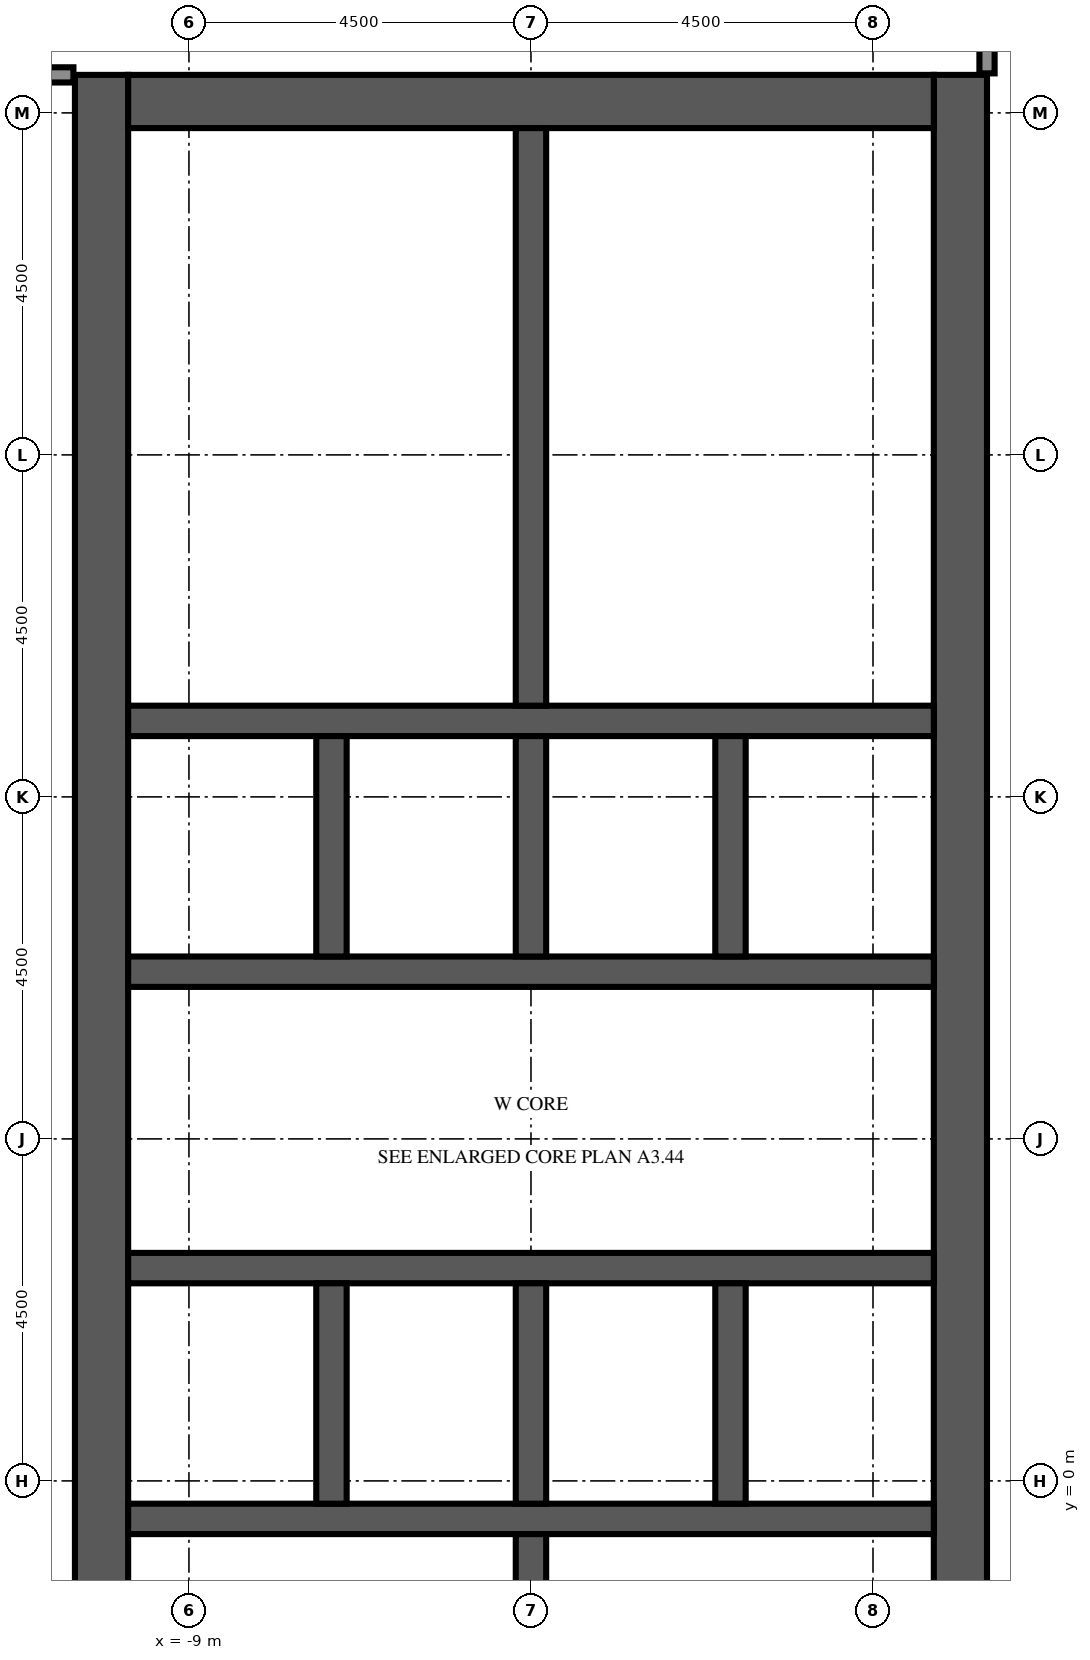
"""IFC4 building model, lengths in metres.
Left out: names, types, materials, properties, quantities, classifications, styles, units other than length and angle.
Written with IfcOpenShell. Run it as: python <this file> out.ifc"""

import sys

from ifc_helpers import new_model, si_unit, direction, frame, frame_2d, origin, place, context, subcontext, project, spatial, rectangle, extrude, element, fill, save


model = new_model("IFC4")
c1 = context("Model", 3, precision=1e-05, world=origin(), true_north=direction((0.0, 1.0)))
c2 = subcontext(c1, "Body", "Model", "MODEL_VIEW")
j1 = project(units=[si_unit("LENGTHUNIT", "METRE"), si_unit("PLANEANGLEUNIT", "RADIAN")], contexts=[c1])
p1 = place(None, origin())
s1 = spatial("IfcSite", under=j1, at=p1, CompositionType="ELEMENT")
p2 = place(p1, origin())
s2 = spatial("IfcBuilding", under=s1, at=p2, CompositionType="ELEMENT")
p3 = place(p2, frame((0.0, 0.0, 301.0)))
s3 = spatial("IfcBuildingStorey", under=s2, at=p3, CompositionType="ELEMENT", Elevation=301.0)
p4 = place(p3, frame((-10.15, -9.0, 0.0), z_axis=(0.0, 0.0, 1.0), x_axis=(0.0, 1.0, 0.0)))
e1 = element("IfcWall", 1, at=p4, inside=s3, PredefinedType="SHEAR", context=c2, shape_type="SweptSolid", body=[
    extrude(rectangle(XDim=27.5, YDim=0.7, at=frame_2d((13.75, 0.0))), origin(), (0.0, 0.0, 1.0), 5.4),
])
p5 = place(p4, frame((12.55, 0.0, 0.0)))
e2 = element("IfcOpeningElement", 2, at=p5, cuts=e1, PredefinedType="OPENING", context=c2, shape_type="SweptSolid", body=[
    extrude(rectangle(XDim=2.4, YDim=2.4, at=frame_2d((1.2, 1.2))), frame((0.0, 0.36, 0.0), z_axis=(0.0, -1.0, 0.0), x_axis=(1.0, 0.0, 0.0)), (0.0, 0.0, 1.0), 0.72),
])
p6 = place(p4, frame((6.825, 0.0, 0.0)))
e3 = element("IfcOpeningElement", 3, at=p6, cuts=e1, PredefinedType="OPENING", context=c2, shape_type="SweptSolid", body=[
    extrude(rectangle(XDim=1.2, YDim=2.1, at=frame_2d((0.6, 1.05))), frame((0.0, 0.36, 0.0), z_axis=(0.0, -1.0, 0.0), x_axis=(1.0, 0.0, 0.0)), (0.0, 0.0, 1.0), 0.72),
])
p7 = place(p4, frame((19.475, 0.0, 0.0)))
e4 = element("IfcOpeningElement", 4, at=p7, cuts=e1, PredefinedType="OPENING", context=c2, shape_type="SweptSolid", body=[
    extrude(rectangle(XDim=1.2, YDim=2.1, at=frame_2d((0.6, 1.05))), frame((0.0, 0.36, 0.0), z_axis=(0.0, -1.0, 0.0), x_axis=(1.0, 0.0, 0.0)), (0.0, 0.0, 1.0), 0.72),
])
p8 = place(p3, frame((1.15, -9.0, 0.0), z_axis=(0.0, 0.0, 1.0), x_axis=(0.0, 1.0, 0.0)))
e5 = element("IfcWall", 5, at=p8, inside=s3, PredefinedType="SHEAR", context=c2, shape_type="SweptSolid", body=[
    extrude(rectangle(XDim=27.5, YDim=0.7, at=frame_2d((13.75, 0.0))), origin(), (0.0, 0.0, 1.0), 5.4),
])
p9 = place(p8, frame((12.55, 0.0, 0.0)))
e6 = element("IfcOpeningElement", 6, at=p9, cuts=e5, PredefinedType="OPENING", context=c2, shape_type="SweptSolid", body=[
    extrude(rectangle(XDim=2.4, YDim=2.4, at=frame_2d((1.2, 1.2))), frame((0.0, 0.36, 0.0), z_axis=(0.0, -1.0, 0.0), x_axis=(1.0, 0.0, 0.0)), (0.0, 0.0, 1.0), 0.72),
])
p10 = place(p8, frame((5.46, 0.0, 0.0)))
e7 = element("IfcOpeningElement", 7, at=p10, cuts=e5, PredefinedType="OPENING", context=c2, shape_type="SweptSolid", body=[
    extrude(rectangle(XDim=0.968, YDim=2.1, at=frame_2d((0.484, 1.05))), frame((0.0, 0.36, 0.0), z_axis=(0.0, -1.0, 0.0), x_axis=(1.0, 0.0, 0.0)), (0.0, 0.0, 1.0), 0.72),
])
p11 = place(p8, frame((23.54, 0.0, 0.0)))
e8 = element("IfcOpeningElement", 8, at=p11, cuts=e5, PredefinedType="OPENING", context=c2, shape_type="SweptSolid", body=[
    extrude(rectangle(XDim=1.2, YDim=2.1, at=frame_2d((0.6, 1.05))), frame((0.0, 0.36, 0.0), z_axis=(0.0, -1.0, 0.0), x_axis=(1.0, 0.0, 0.0)), (0.0, 0.0, 1.0), 0.72),
])
p12 = place(p3, frame((-9.8, 18.15, 0.0), z_axis=(0.0, 0.0, 1.0), x_axis=(1.0, 0.0, 0.0)))
e9 = element("IfcWall", 9, at=p12, inside=s3, PredefinedType="SHEAR", context=c2, shape_type="SweptSolid", body=[
    extrude(rectangle(XDim=10.6, YDim=0.7, at=frame_2d((5.3, 0.0))), origin(), (0.0, 0.0, 1.0), 5.4),
])
p13 = place(p3, frame((-9.8, -0.5, 0.0), z_axis=(0.0, 0.0, 1.0), x_axis=(1.0, 0.0, 0.0)))
e10 = element("IfcWall", 10, at=p13, inside=s3, PredefinedType="SHEAR", context=c2, shape_type="SweptSolid", body=[
    extrude(rectangle(XDim=10.6, YDim=0.4, at=frame_2d((5.3, 0.0))), origin(), (0.0, 0.0, 1.0), 5.4),
])
p14 = place(p3, frame((-9.8, 2.8, 0.0), z_axis=(0.0, 0.0, 1.0), x_axis=(1.0, 0.0, 0.0)))
e11 = element("IfcWall", 11, at=p14, inside=s3, PredefinedType="SHEAR", context=c2, shape_type="SweptSolid", body=[
    extrude(rectangle(XDim=10.6, YDim=0.4, at=frame_2d((5.3, 0.0))), origin(), (0.0, 0.0, 1.0), 5.4),
])
p15 = place(p14, frame((0.688, 0.0, 0.0)))
e12 = element("IfcOpeningElement", 12, at=p15, cuts=e11, PredefinedType="OPENING", context=c2, shape_type="SweptSolid", body=[
    extrude(rectangle(XDim=1.1, YDim=2.1, at=frame_2d((0.55, 1.05))), frame((0.0, 0.21, 0.0), z_axis=(0.0, -1.0, 0.0), x_axis=(1.0, 0.0, 0.0)), (0.0, 0.0, 1.0), 0.42),
])
p16 = place(p14, frame((3.438, 0.0, 0.0)))
e13 = element("IfcOpeningElement", 13, at=p16, cuts=e11, PredefinedType="OPENING", context=c2, shape_type="SweptSolid", body=[
    extrude(rectangle(XDim=1.1, YDim=2.1, at=frame_2d((0.55, 1.05))), frame((0.0, 0.21, 0.0), z_axis=(0.0, -1.0, 0.0), x_axis=(1.0, 0.0, 0.0)), (0.0, 0.0, 1.0), 0.42),
])
p17 = place(p14, frame((6.113, 0.0, 0.0)))
e14 = element("IfcOpeningElement", 14, at=p17, cuts=e11, PredefinedType="OPENING", context=c2, shape_type="SweptSolid", body=[
    extrude(rectangle(XDim=1.0, YDim=2.1, at=frame_2d((0.5, 1.05))), frame((0.0, 0.21, 0.0), z_axis=(0.0, -1.0, 0.0), x_axis=(1.0, 0.0, 0.0)), (0.0, 0.0, 1.0), 0.42),
])
p18 = place(p14, frame((8.863, 0.0, 0.0)))
e15 = element("IfcOpeningElement", 15, at=p18, cuts=e11, PredefinedType="OPENING", context=c2, shape_type="SweptSolid", body=[
    extrude(rectangle(XDim=1.0, YDim=2.1, at=frame_2d((0.5, 1.05))), frame((0.0, 0.21, 0.0), z_axis=(0.0, -1.0, 0.0), x_axis=(1.0, 0.0, 0.0)), (0.0, 0.0, 1.0), 0.42),
])
p19 = place(p3, frame((-9.8, 6.7, 0.0), z_axis=(0.0, 0.0, 1.0), x_axis=(1.0, 0.0, 0.0)))
e16 = element("IfcWall", 16, at=p19, inside=s3, PredefinedType="SHEAR", context=c2, shape_type="SweptSolid", body=[
    extrude(rectangle(XDim=10.6, YDim=0.4, at=frame_2d((5.3, 0.0))), origin(), (0.0, 0.0, 1.0), 5.4),
])
p20 = place(p19, frame((0.738, 0.0, 0.0)))
e17 = element("IfcOpeningElement", 17, at=p20, cuts=e16, PredefinedType="OPENING", context=c2, shape_type="SweptSolid", body=[
    extrude(rectangle(XDim=1.0, YDim=2.1, at=frame_2d((0.5, 1.05))), frame((0.0, 0.21, 0.0), z_axis=(0.0, -1.0, 0.0), x_axis=(1.0, 0.0, 0.0)), (0.0, 0.0, 1.0), 0.42),
])
p21 = place(p19, frame((3.488, 0.0, 0.0)))
e18 = element("IfcOpeningElement", 18, at=p21, cuts=e16, PredefinedType="OPENING", context=c2, shape_type="SweptSolid", body=[
    extrude(rectangle(XDim=1.0, YDim=2.1, at=frame_2d((0.5, 1.05))), frame((0.0, 0.21, 0.0), z_axis=(0.0, -1.0, 0.0), x_axis=(1.0, 0.0, 0.0)), (0.0, 0.0, 1.0), 0.42),
])
p22 = place(p19, frame((6.113, 0.0, 0.0)))
e19 = element("IfcOpeningElement", 19, at=p22, cuts=e16, PredefinedType="OPENING", context=c2, shape_type="SweptSolid", body=[
    extrude(rectangle(XDim=1.0, YDim=2.1, at=frame_2d((0.5, 1.05))), frame((0.0, 0.21, 0.0), z_axis=(0.0, -1.0, 0.0), x_axis=(1.0, 0.0, 0.0)), (0.0, 0.0, 1.0), 0.42),
])
p23 = place(p19, frame((8.863, 0.0, 0.0)))
e20 = element("IfcOpeningElement", 20, at=p23, cuts=e16, PredefinedType="OPENING", context=c2, shape_type="SweptSolid", body=[
    extrude(rectangle(XDim=1.0, YDim=2.1, at=frame_2d((0.5, 1.05))), frame((0.0, 0.21, 0.0), z_axis=(0.0, -1.0, 0.0), x_axis=(1.0, 0.0, 0.0)), (0.0, 0.0, 1.0), 0.42),
])
p24 = place(p3, frame((-9.8, 10.0, 0.0), z_axis=(0.0, 0.0, 1.0), x_axis=(1.0, 0.0, 0.0)))
e21 = element("IfcWall", 21, at=p24, inside=s3, PredefinedType="SHEAR", context=c2, shape_type="SweptSolid", body=[
    extrude(rectangle(XDim=10.6, YDim=0.4, at=frame_2d((5.3, 0.0))), origin(), (0.0, 0.0, 1.0), 5.4),
])
for number, where, z_axis, x_axis in (
    (22, (-7.125, -0.3, 0.0), (0.0, 0.0, 1.0), (0.0, 1.0, 0.0)),
    (23, (-7.125, 6.9, 0.0), (0.0, 0.0, 1.0), (0.0, 1.0, 0.0)),
    (24, (-4.5, -0.3, 0.0), (0.0, 0.0, 1.0), (0.0, 1.0, 0.0)),
    (25, (-4.5, 6.9, 0.0), (0.0, 0.0, 1.0), (0.0, 1.0, 0.0)),
    (26, (-1.875, -0.3, 0.0), (0.0, 0.0, 1.0), (0.0, 1.0, 0.0)),
    (27, (-1.875, 6.9, 0.0), (0.0, 0.0, 1.0), (0.0, 1.0, 0.0)),
):
    element("IfcWall", number, at=place(p3, frame(where, z_axis=z_axis, x_axis=x_axis)), inside=s3, PredefinedType="SHEAR", context=c2, shape_type="SweptSolid", body=[
        extrude(rectangle(XDim=2.9, YDim=0.4, at=frame_2d((1.45, 0.0))), origin(), (0.0, 0.0, 1.0), 5.4),
    ])
for number, where, z_axis, x_axis in (
    (28, (-4.5, -8.3, 0.0), (0.0, 0.0, 1.0), (0.0, 1.0, 0.0)),
    (29, (-4.5, 10.2, 0.0), (0.0, 0.0, 1.0), (0.0, 1.0, 0.0)),
):
    element("IfcWall", number, at=place(p3, frame(where, z_axis=z_axis, x_axis=x_axis)), inside=s3, PredefinedType="SHEAR", context=c2, shape_type="SweptSolid", body=[
        extrude(rectangle(XDim=7.6, YDim=0.4, at=frame_2d((3.8, 0.0))), origin(), (0.0, 0.0, 1.0), 5.4),
    ])
p25 = place(p3, frame((-13.0, 18.5, 0.0), z_axis=(0.0, 0.0, 1.0), x_axis=(1.0, 0.0, 0.0)))
e30 = element("IfcWall", 30, at=p25, inside=s3, PredefinedType="PARTITIONING", context=c2, shape_type="SweptSolid", body=[
    extrude(rectangle(XDim=2.48, YDim=0.2, at=frame_2d((1.24, 0.0))), origin(), (0.0, 0.0, 1.0), 4.8),
])
p26 = place(p3, frame((1.5, 18.52, 0.0), z_axis=(0.0, 0.0, 1.0), x_axis=(0.0, 1.0, 0.0)))
e31 = element("IfcWall", 31, at=p26, inside=s3, PredefinedType="PARTITIONING", context=c2, shape_type="SweptSolid", body=[
    extrude(rectangle(XDim=3.835, YDim=0.2, at=frame_2d((1.917, 0.0))), origin(), (0.0, 0.0, 1.0), 4.8),
])
p27 = place(p26, frame((1.58, 0.0, 0.0)))
e32 = element("IfcOpeningElement", 32, at=p27, cuts=e31, PredefinedType="OPENING", context=c2, shape_type="SweptSolid", body=[
    extrude(rectangle(XDim=1.0, YDim=2.1, at=frame_2d((0.5, 1.05))), frame((0.0, 0.11, 0.0), z_axis=(0.0, -1.0, 0.0), x_axis=(1.0, 0.0, 0.0)), (0.0, 0.0, 1.0), 0.22),
])
p28 = place(p3, frame((-1.75, -2.372, 0.0), z_axis=(0.0, 0.0, 1.0), x_axis=(0.0, 1.0, 0.0)))
e33 = element("IfcWall", 33, at=p28, inside=s3, PredefinedType="PARTITIONING", context=c2, shape_type="SweptSolid", body=[
    extrude(rectangle(XDim=1.672, YDim=0.1, at=frame_2d((0.836, 0.0))), origin(), (0.0, 0.0, 1.0), 4.8),
])
p29 = place(p3, frame((-0.5, 12.48, 0.0), z_axis=(0.0, 0.0, 1.0), x_axis=(1.0, 0.0, 0.0)))
e34 = element("IfcWall", 34, at=p29, inside=s3, PredefinedType="PARTITIONING", context=c2, shape_type="SweptSolid", body=[
    extrude(rectangle(XDim=1.3, YDim=0.1, at=frame_2d((0.65, 0.0))), origin(), (0.0, 0.0, 1.0), 4.8),
])
p30 = place(p29, frame((0.2, 0.0, 0.0)))
e35 = element("IfcOpeningElement", 35, at=p30, cuts=e34, PredefinedType="OPENING", context=c2, shape_type="SweptSolid", body=[
    extrude(rectangle(XDim=0.9, YDim=2.1, at=frame_2d((0.45, 1.05))), frame((0.0, 0.06, 0.0), z_axis=(0.0, -1.0, 0.0), x_axis=(1.0, 0.0, 0.0)), (0.0, 0.0, 1.0), 0.12),
])
p31 = place(p3, frame((-4.3, 12.48, 0.0), z_axis=(0.0, 0.0, 1.0), x_axis=(1.0, 0.0, 0.0)))
e36 = element("IfcWall", 36, at=p31, inside=s3, PredefinedType="PARTITIONING", context=c2, shape_type="SweptSolid", body=[
    extrude(rectangle(XDim=3.8, YDim=0.1, at=frame_2d((1.9, 0.0))), origin(), (0.0, 0.0, 1.0), 4.8),
])
p32 = place(p3, frame((-0.5, 12.48, 0.0), z_axis=(0.0, 0.0, 1.0), x_axis=(0.0, 1.0, 0.0)))
e37 = element("IfcWall", 37, at=p32, inside=s3, PredefinedType="PARTITIONING", context=c2, shape_type="SweptSolid", body=[
    extrude(rectangle(XDim=2.66, YDim=0.1, at=frame_2d((1.33, 0.0))), origin(), (0.0, 0.0, 1.0), 4.8),
])
p33 = place(p32, frame((0.83, 0.0, 0.0)))
e38 = element("IfcOpeningElement", 38, at=p33, cuts=e37, PredefinedType="OPENING", context=c2, shape_type="SweptSolid", body=[
    extrude(rectangle(XDim=1.0, YDim=2.1, at=frame_2d((0.5, 1.05))), frame((0.0, 0.06, 0.0), z_axis=(0.0, -1.0, 0.0), x_axis=(1.0, 0.0, 0.0)), (0.0, 0.0, 1.0), 0.12),
])
p34 = place(p3, frame((-0.5, 15.14, 0.0), z_axis=(0.0, 0.0, 1.0), x_axis=(0.0, 1.0, 0.0)))
e39 = element("IfcWall", 39, at=p34, inside=s3, PredefinedType="PARTITIONING", context=c2, shape_type="SweptSolid", body=[
    extrude(rectangle(XDim=2.66, YDim=0.1, at=frame_2d((1.33, 0.0))), origin(), (0.0, 0.0, 1.0), 4.8),
])
p35 = place(p34, frame((0.83, 0.0, 0.0)))
e40 = element("IfcOpeningElement", 40, at=p35, cuts=e39, PredefinedType="OPENING", context=c2, shape_type="SweptSolid", body=[
    extrude(rectangle(XDim=1.0, YDim=2.1, at=frame_2d((0.5, 1.05))), frame((0.0, 0.06, 0.0), z_axis=(0.0, -1.0, 0.0), x_axis=(1.0, 0.0, 0.0)), (0.0, 0.0, 1.0), 0.12),
])
p36 = place(p3, frame((-4.3, 15.14, 0.0), z_axis=(0.0, 0.0, 1.0), x_axis=(1.0, 0.0, 0.0)))
e41 = element("IfcWall", 41, at=p36, inside=s3, PredefinedType="PARTITIONING", context=c2, shape_type="SweptSolid", body=[
    extrude(rectangle(XDim=3.8, YDim=0.1, at=frame_2d((1.9, 0.0))), origin(), (0.0, 0.0, 1.0), 4.8),
])
p37 = place(p15, origin())
e42 = element("IfcDoor", 42, at=p37, inside=s3, OperationType="DOUBLE_DOOR_SLIDING", PredefinedType="DOOR", context=c2, shape_type="SweptSolid", body=[
    extrude(rectangle(XDim=1.1, YDim=2.1, at=frame_2d((0.55, 1.05))), frame((0.0, 0.025, 0.0), z_axis=(0.0, -1.0, 0.0), x_axis=(1.0, 0.0, 0.0)), (0.0, 0.0, 1.0), 0.05),
])
fill(e12, e42)
p38 = place(p16, origin())
e43 = element("IfcDoor", 43, at=p38, inside=s3, OperationType="DOUBLE_DOOR_SLIDING", PredefinedType="DOOR", context=c2, shape_type="SweptSolid", body=[
    extrude(rectangle(XDim=1.1, YDim=2.1, at=frame_2d((0.55, 1.05))), frame((0.0, 0.025, 0.0), z_axis=(0.0, -1.0, 0.0), x_axis=(1.0, 0.0, 0.0)), (0.0, 0.0, 1.0), 0.05),
])
fill(e13, e43)
p39 = place(p5, origin())
e44 = element("IfcDoor", 44, at=p39, inside=s3, OperationType="DOUBLE_DOOR_DOUBLE_SWING", PredefinedType="DOOR", context=c2, shape_type="SweptSolid", body=[
    extrude(rectangle(XDim=2.4, YDim=2.4, at=frame_2d((1.2, 1.2))), frame((0.0, 0.025, 0.0), z_axis=(0.0, -1.0, 0.0), x_axis=(1.0, 0.0, 0.0)), (0.0, 0.0, 1.0), 0.05),
])
fill(e2, e44)
p40 = place(p9, origin())
e45 = element("IfcDoor", 45, at=p40, inside=s3, OperationType="DOUBLE_DOOR_DOUBLE_SWING", PredefinedType="DOOR", context=c2, shape_type="SweptSolid", body=[
    extrude(rectangle(XDim=2.4, YDim=2.4, at=frame_2d((1.2, 1.2))), frame((0.0, 0.025, 0.0), z_axis=(0.0, -1.0, 0.0), x_axis=(1.0, 0.0, 0.0)), (0.0, 0.0, 1.0), 0.05),
])
fill(e6, e45)
p41 = place(p6, origin())
e46 = element("IfcDoor", 46, at=p41, inside=s3, OperationType="SINGLE_SWING_LEFT", PredefinedType="DOOR", context=c2, shape_type="SweptSolid", body=[
    extrude(rectangle(XDim=1.2, YDim=2.1, at=frame_2d((0.6, 1.05))), frame((0.0, 0.025, 0.0), z_axis=(0.0, -1.0, 0.0), x_axis=(1.0, 0.0, 0.0)), (0.0, 0.0, 1.0), 0.05),
])
fill(e3, e46)
p42 = place(p7, origin())
e47 = element("IfcDoor", 47, at=p42, inside=s3, OperationType="SINGLE_SWING_LEFT", PredefinedType="DOOR", context=c2, shape_type="SweptSolid", body=[
    extrude(rectangle(XDim=1.2, YDim=2.1, at=frame_2d((0.6, 1.05))), frame((0.0, 0.025, 0.0), z_axis=(0.0, -1.0, 0.0), x_axis=(1.0, 0.0, 0.0)), (0.0, 0.0, 1.0), 0.05),
])
fill(e4, e47)
p43 = place(p17, origin())
e48 = element("IfcDoor", 48, at=p43, inside=s3, OperationType="SINGLE_SWING_LEFT", PredefinedType="DOOR", context=c2, shape_type="SweptSolid", body=[
    extrude(rectangle(XDim=1.0, YDim=2.1, at=frame_2d((0.5, 1.05))), frame((0.0, 0.025, 0.0), z_axis=(0.0, -1.0, 0.0), x_axis=(1.0, 0.0, 0.0)), (0.0, 0.0, 1.0), 0.05),
])
fill(e14, e48)
p44 = place(p18, origin())
e49 = element("IfcDoor", 49, at=p44, inside=s3, OperationType="SINGLE_SWING_RIGHT", PredefinedType="DOOR", context=c2, shape_type="SweptSolid", body=[
    extrude(rectangle(XDim=1.0, YDim=2.1, at=frame_2d((0.5, 1.05))), frame((0.0, 0.025, 0.0), z_axis=(0.0, -1.0, 0.0), x_axis=(1.0, 0.0, 0.0)), (0.0, 0.0, 1.0), 0.05),
])
fill(e15, e49)
p45 = place(p20, origin())
e50 = element("IfcDoor", 50, at=p45, inside=s3, OperationType="SINGLE_SWING_LEFT", PredefinedType="DOOR", context=c2, shape_type="SweptSolid", body=[
    extrude(rectangle(XDim=1.0, YDim=2.1, at=frame_2d((0.5, 1.05))), frame((0.0, 0.025, 0.0), z_axis=(0.0, -1.0, 0.0), x_axis=(1.0, 0.0, 0.0)), (0.0, 0.0, 1.0), 0.05),
])
fill(e17, e50)
p46 = place(p21, origin())
e51 = element("IfcDoor", 51, at=p46, inside=s3, OperationType="SINGLE_SWING_RIGHT", PredefinedType="DOOR", context=c2, shape_type="SweptSolid", body=[
    extrude(rectangle(XDim=1.0, YDim=2.1, at=frame_2d((0.5, 1.05))), frame((0.0, 0.025, 0.0), z_axis=(0.0, -1.0, 0.0), x_axis=(1.0, 0.0, 0.0)), (0.0, 0.0, 1.0), 0.05),
])
fill(e18, e51)
p47 = place(p22, origin())
e52 = element("IfcDoor", 52, at=p47, inside=s3, OperationType="SINGLE_SWING_LEFT", PredefinedType="DOOR", context=c2, shape_type="SweptSolid", body=[
    extrude(rectangle(XDim=1.0, YDim=2.1, at=frame_2d((0.5, 1.05))), frame((0.0, 0.025, 0.0), z_axis=(0.0, -1.0, 0.0), x_axis=(1.0, 0.0, 0.0)), (0.0, 0.0, 1.0), 0.05),
])
fill(e19, e52)
p48 = place(p23, origin())
e53 = element("IfcDoor", 53, at=p48, inside=s3, OperationType="SINGLE_SWING_RIGHT", PredefinedType="DOOR", context=c2, shape_type="SweptSolid", body=[
    extrude(rectangle(XDim=1.0, YDim=2.1, at=frame_2d((0.5, 1.05))), frame((0.0, 0.025, 0.0), z_axis=(0.0, -1.0, 0.0), x_axis=(1.0, 0.0, 0.0)), (0.0, 0.0, 1.0), 0.05),
])
fill(e20, e53)
p49 = place(p30, origin())
e54 = element("IfcDoor", 54, at=p49, inside=s3, OperationType="SINGLE_SWING_LEFT", PredefinedType="DOOR", context=c2, shape_type="SweptSolid", body=[
    extrude(rectangle(XDim=0.9, YDim=2.1, at=frame_2d((0.45, 1.05))), frame((0.0, 0.025, 0.0), z_axis=(0.0, -1.0, 0.0), x_axis=(1.0, 0.0, 0.0)), (0.0, 0.0, 1.0), 0.05),
])
fill(e35, e54)
p50 = place(p11, origin())
e55 = element("IfcDoor", 55, at=p50, inside=s3, OperationType="SINGLE_SWING_RIGHT", PredefinedType="DOOR", context=c2, shape_type="SweptSolid", body=[
    extrude(rectangle(XDim=1.2, YDim=2.1, at=frame_2d((0.6, 1.05))), frame((0.0, 0.325, 0.0), z_axis=(0.0, -1.0, 0.0), x_axis=(1.0, 0.0, 0.0)), (0.0, 0.0, 1.0), 0.05),
])
fill(e8, e55)
p51 = place(p33, origin())
e56 = element("IfcDoor", 56, at=p51, inside=s3, OperationType="SINGLE_SWING_LEFT", PredefinedType="DOOR", context=c2, shape_type="SweptSolid", body=[
    extrude(rectangle(XDim=1.0, YDim=2.1, at=frame_2d((0.5, 1.05))), frame((0.0, 0.025, 0.0), z_axis=(0.0, -1.0, 0.0), x_axis=(1.0, 0.0, 0.0)), (0.0, 0.0, 1.0), 0.05),
])
fill(e38, e56)
p52 = place(p35, origin())
e57 = element("IfcDoor", 57, at=p52, inside=s3, OperationType="SINGLE_SWING_RIGHT", PredefinedType="DOOR", context=c2, shape_type="SweptSolid", body=[
    extrude(rectangle(XDim=1.0, YDim=2.1, at=frame_2d((0.5, 1.05))), frame((0.0, 0.025, 0.0), z_axis=(0.0, -1.0, 0.0), x_axis=(1.0, 0.0, 0.0)), (0.0, 0.0, 1.0), 0.05),
])
fill(e40, e57)
save(model, sys.argv[1])
